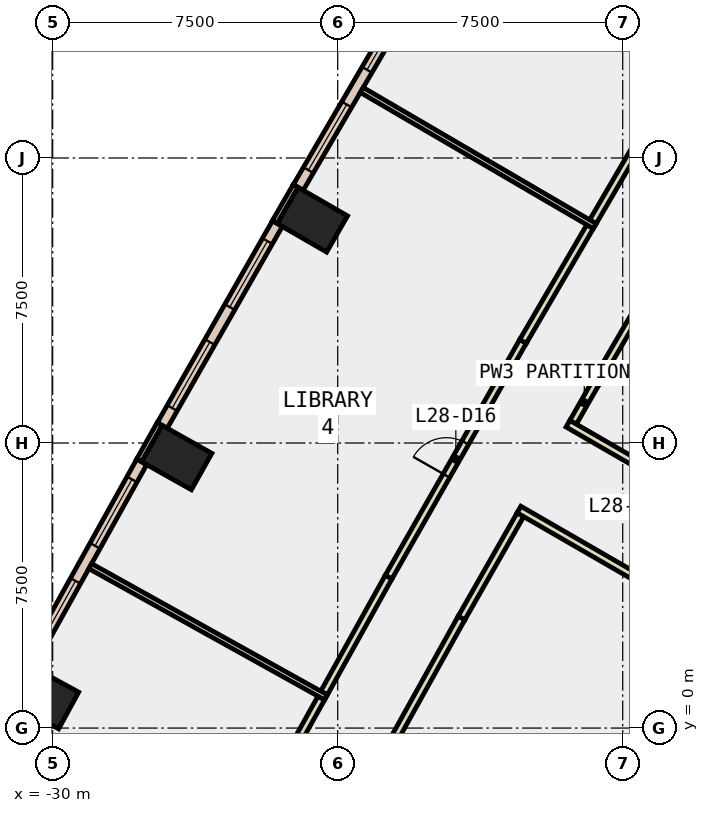
"""IFC4 building model, lengths in metres.
Left out: names, types, materials, properties, quantities, classifications, styles, units other than length and angle.
Written with IfcOpenShell. Run it as: python <this file> out.ifc"""

import sys

from ifc_helpers import new_model, si_unit, direction, frame, frame_2d, origin, origin_2d, place, context, subcontext, project, spatial, rectangle, extrude, element, fill, save


model = new_model("IFC4")
c1 = context("Model", 3, precision=1e-05, world=origin(), true_north=direction((0.0, 1.0)))
c2 = subcontext(c1, "Body", "Model", "MODEL_VIEW")
j1 = project(units=[si_unit("LENGTHUNIT", "METRE"), si_unit("PLANEANGLEUNIT", "RADIAN")], contexts=[c1])
p1 = place(None, origin())
s1 = spatial("IfcSite", under=j1, at=p1, CompositionType="ELEMENT")
p2 = place(p1, origin())
s2 = spatial("IfcBuilding", under=s1, at=p2, CompositionType="ELEMENT")
p3 = place(p2, frame((0.0, 0.0, 128.6)))
s3 = spatial("IfcBuildingStorey", under=s2, at=p3, CompositionType="ELEMENT", Elevation=128.6)
for number, where, z_axis, x_axis in (
    (1, (-23.166, 13.375, -0.4), (0.0, 0.0, 1.0), (0.5, 0.866, 0.0)),
    (2, (-26.735, 7.117, -0.4), (0.0, 0.0, 1.0), (0.49, 0.872, 0.0)),
    (3, (-30.238, 0.822, -0.4), (0.0, 0.0, 1.0), (0.48, 0.877, 0.0)),
):
    element("IfcColumn", number, at=place(p3, frame(where, z_axis=z_axis, x_axis=x_axis)), inside=s3, PredefinedType="COLUMN", context=c2, shape_type="SweptSolid", body=[
        extrude(rectangle(XDim=1.1, YDim=1.5, at=origin_2d()), origin(), (0.0, 0.0, 1.0), 4.0),
    ])
p4 = place(p3, frame((-23.605, 14.264, 0.0), z_axis=(0.0, 0.0, 1.0), x_axis=(-0.499933745558, -0.866063652425, 0.0)))
e4 = element("IfcWall", 4, at=p4, inside=s3, PredefinedType="STANDARD", context=c2, shape_type="SweptSolid", body=[
    extrude(rectangle(XDim=1.1, YDim=0.15, at=frame_2d((0.55, 0.0))), origin(), (0.0, 0.0, 1.0), 3.6),
])
p5 = place(p3, frame((-27.185, 8.001, 0.0), z_axis=(0.0, 0.0, 1.0), x_axis=(-0.490008344094, -0.871717742574, 0.0)))
e5 = element("IfcWall", 5, at=p5, inside=s3, PredefinedType="STANDARD", context=c2, shape_type="SweptSolid", body=[
    extrude(rectangle(XDim=1.1, YDim=0.15, at=frame_2d((0.55, 0.0))), origin(), (0.0, 0.0, 1.0), 3.6),
])
p6 = place(p3, frame((-20.454, 19.503, 0.0), z_axis=(0.0, 0.0, 1.0), x_axis=(-0.504441987427, -0.863445586775, 0.0)))
e6 = element("IfcWall", 6, at=p6, inside=s3, PredefinedType="STANDARD", context=c2, shape_type="SweptSolid", body=[
    extrude(rectangle(XDim=6.114, YDim=0.3, at=frame_2d((3.057, 0.0))), origin(), (0.0, 0.0, 1.0), 3.6),
])
p7 = place(p6, frame((0.528, 0.0, 0.9)))
e7 = element("IfcOpeningElement", 7, at=p7, cuts=e6, PredefinedType="OPENING", context=c2, shape_type="SweptSolid", body=[
    extrude(rectangle(XDim=2.0, YDim=2.6, at=frame_2d((1.0, 1.3))), frame((0.0, 0.16, 0.0), z_axis=(0.0, -1.0, 0.0), x_axis=(1.0, 0.0, 0.0)), (0.0, 0.0, 1.0), 0.32),
])
p8 = place(p6, frame((3.585, 0.0, 0.9)))
e8 = element("IfcOpeningElement", 8, at=p8, cuts=e6, PredefinedType="OPENING", context=c2, shape_type="SweptSolid", body=[
    extrude(rectangle(XDim=2.0, YDim=2.6, at=frame_2d((1.0, 1.3))), frame((0.0, 0.16, 0.0), z_axis=(0.0, -1.0, 0.0), x_axis=(1.0, 0.0, 0.0)), (0.0, 0.0, 1.0), 0.32),
])
p9 = place(p3, frame((-24.087, 13.273, 0.0), z_axis=(0.0, 0.0, 1.0), x_axis=(-0.495472401298, -0.868623681206, 0.0)))
e9 = element("IfcWall", 9, at=p9, inside=s3, PredefinedType="STANDARD", context=c2, shape_type="SweptSolid", body=[
    extrude(rectangle(XDim=6.115, YDim=0.3, at=frame_2d((3.058, 0.0))), origin(), (0.0, 0.0, 1.0), 3.6),
])
p10 = place(p9, frame((0.529, 0.0, 0.9)))
e10 = element("IfcOpeningElement", 10, at=p10, cuts=e9, PredefinedType="OPENING", context=c2, shape_type="SweptSolid", body=[
    extrude(rectangle(XDim=2.0, YDim=2.6, at=frame_2d((1.0, 1.3))), frame((0.0, 0.16, 0.0), z_axis=(0.0, -1.0, 0.0), x_axis=(1.0, 0.0, 0.0)), (0.0, 0.0, 1.0), 0.32),
])
p11 = place(p9, frame((3.587, 0.0, 0.9)))
e11 = element("IfcOpeningElement", 11, at=p11, cuts=e9, PredefinedType="OPENING", context=c2, shape_type="SweptSolid", body=[
    extrude(rectangle(XDim=2.0, YDim=2.6, at=frame_2d((1.0, 1.3))), frame((0.0, 0.16, 0.0), z_axis=(0.0, -1.0, 0.0), x_axis=(1.0, 0.0, 0.0)), (0.0, 0.0, 1.0), 0.32),
])
p12 = place(p3, frame((-27.656, 7.005, 0.0), z_axis=(0.0, 0.0, 1.0), x_axis=(-0.486229342917, -0.873831234327, 0.0)))
e12 = element("IfcWall", 12, at=p12, inside=s3, PredefinedType="STANDARD", context=c2, shape_type="SweptSolid", body=[
    extrude(rectangle(XDim=6.114, YDim=0.3, at=frame_2d((3.057, 0.0))), origin(), (0.0, 0.0, 1.0), 3.6),
])
p13 = place(p12, frame((0.529, 0.0, 0.9)))
e13 = element("IfcOpeningElement", 13, at=p13, cuts=e12, PredefinedType="OPENING", context=c2, shape_type="SweptSolid", body=[
    extrude(rectangle(XDim=2.0, YDim=2.6, at=frame_2d((1.0, 1.3))), frame((0.0, 0.16, 0.0), z_axis=(0.0, -1.0, 0.0), x_axis=(1.0, 0.0, 0.0)), (0.0, 0.0, 1.0), 0.32),
])
p14 = place(p12, frame((3.586, 0.0, 0.9)))
e14 = element("IfcOpeningElement", 14, at=p14, cuts=e12, PredefinedType="OPENING", context=c2, shape_type="SweptSolid", body=[
    extrude(rectangle(XDim=2.0, YDim=2.6, at=frame_2d((1.0, 1.3))), frame((0.0, 0.16, 0.0), z_axis=(0.0, -1.0, 0.0), x_axis=(1.0, 0.0, 0.0)), (0.0, 0.0, 1.0), 0.32),
])
p15 = place(p3, frame((-13.801, 12.356, 0.0), z_axis=(0.0, 0.0, 1.0), x_axis=(-0.504282474222, -0.863538757782, 0.0)))
e15 = element("IfcWall", 15, at=p15, inside=s3, PredefinedType="PARTITIONING", context=c2, shape_type="SweptSolid", body=[
    extrude(rectangle(XDim=3.8, YDim=0.2, at=frame_2d((1.9, 0.0))), origin(), (0.0, 0.0, 1.0), 3.6),
])
p16 = place(p3, frame((-15.717, 9.075, 0.0), z_axis=(0.0, 0.0, 1.0), x_axis=(-0.495695496657, -0.868496387208, 0.0)))
e16 = element("IfcWall", 16, at=p16, inside=s3, PredefinedType="PARTITIONING", context=c2, shape_type="SweptSolid", body=[
    extrude(rectangle(XDim=1.186, YDim=0.2, at=frame_2d((0.593, 0.0))), origin(), (0.0, 0.0, 1.0), 3.6),
])
p17 = place(p3, frame((-16.441, 8.008, 0.0), z_axis=(0.0, 0.0, 1.0), x_axis=(0.866020923391, -0.500007760188, 0.0)))
e17 = element("IfcWall", 17, at=p17, inside=s3, PredefinedType="PARTITIONING", context=c2, shape_type="SweptSolid", body=[
    extrude(rectangle(XDim=4.568, YDim=0.2, at=frame_2d((2.284, 0.0))), origin(), (0.0, 0.0, 1.0), 3.6),
])
p18 = place(p17, frame((1.997, 0.0, 0.0)))
e18 = element("IfcOpeningElement", 18, at=p18, cuts=e17, PredefinedType="OPENING", context=c2, shape_type="SweptSolid", body=[
    extrude(rectangle(XDim=1.0, YDim=2.1, at=frame_2d((0.5, 1.05))), frame((0.0, 0.11, 0.0), z_axis=(0.0, -1.0, 0.0), x_axis=(1.0, 0.0, 0.0)), (0.0, 0.0, 1.0), 0.22),
])
p19 = place(p3, frame((-17.692, 5.613, 0.0), z_axis=(0.0, 0.0, 1.0), x_axis=(-0.495492055461, -0.868612469963, 0.0)))
e19 = element("IfcWall", 19, at=p19, inside=s3, PredefinedType="PARTITIONING", context=c2, shape_type="SweptSolid", body=[
    extrude(rectangle(XDim=3.13, YDim=0.2, at=frame_2d((1.565, 0.0))), origin(), (0.0, 0.0, 1.0), 3.6),
])
p20 = place(p3, frame((-19.243, 2.894, 0.0), z_axis=(0.0, 0.0, 1.0), x_axis=(-0.486304341235, -0.873789498504, 0.0)))
e20 = element("IfcWall", 20, at=p20, inside=s3, PredefinedType="PARTITIONING", context=c2, shape_type="SweptSolid", body=[
    extrude(rectangle(XDim=7.113, YDim=0.2, at=frame_2d((3.556, 0.0))), origin(), (0.0, 0.0, 1.0), 3.6),
])
p21 = place(p3, frame((-15.784, 13.322, 0.0), z_axis=(0.0, 0.0, 1.0), x_axis=(0.50424043703, 0.863563304954, 0.0)))
e21 = element("IfcWall", 21, at=p21, inside=s3, PredefinedType="PARTITIONING", context=c2, shape_type="SweptSolid", body=[
    extrude(rectangle(XDim=3.492, YDim=0.2, at=frame_2d((1.746, 0.0))), origin(), (0.0, 0.0, 1.0), 3.6),
])
p22 = place(p3, frame((-22.859, 0.922, 0.0), z_axis=(0.0, 0.0, 1.0), x_axis=(0.486390484578, 0.873741550181, 0.0)))
e22 = element("IfcWall", 22, at=p22, inside=s3, PredefinedType="PARTITIONING", context=c2, shape_type="SweptSolid", body=[
    extrude(rectangle(XDim=3.493, YDim=0.2, at=frame_2d((1.747, 0.0))), origin(), (0.0, 0.0, 1.0), 3.6),
])
p23 = place(p3, frame((-21.16, 3.974, 0.0), z_axis=(0.0, 0.0, 1.0), x_axis=(0.495450054309, 0.868636427791, 0.0)))
e23 = element("IfcWall", 23, at=p23, inside=s3, PredefinedType="PARTITIONING", context=c2, shape_type="SweptSolid", body=[
    extrude(rectangle(XDim=7.139, YDim=0.2, at=frame_2d((3.569, 0.0))), origin(), (0.0, 0.0, 1.0), 3.6),
])
p24 = place(p23, frame((3.069, 0.0, 0.0)))
e24 = element("IfcOpeningElement", 24, at=p24, cuts=e23, PredefinedType="OPENING", context=c2, shape_type="SweptSolid", body=[
    extrude(rectangle(XDim=1.0, YDim=2.1, at=frame_2d((0.5, 1.05))), frame((0.0, 0.11, 0.0), z_axis=(0.0, -1.0, 0.0), x_axis=(1.0, 0.0, 0.0)), (0.0, 0.0, 1.0), 0.22),
])
p25 = place(p3, frame((-17.623, 10.175, 0.0), z_axis=(0.0, 0.0, 1.0), x_axis=(0.504383407959, 0.863479807393, 0.0)))
e25 = element("IfcWall", 25, at=p25, inside=s3, PredefinedType="PARTITIONING", context=c2, shape_type="SweptSolid", body=[
    extrude(rectangle(XDim=3.495, YDim=0.2, at=frame_2d((1.748, 0.0))), origin(), (0.0, 0.0, 1.0), 3.6),
])
p26 = place(p3, frame((-24.63, -2.262, 0.0), z_axis=(0.0, 0.0, 1.0), x_axis=(0.486058237491, 0.873926421255, 0.0)))
e26 = element("IfcWall", 26, at=p26, inside=s3, PredefinedType="PARTITIONING", context=c2, shape_type="SweptSolid", body=[
    extrude(rectangle(XDim=3.493, YDim=0.2, at=frame_2d((1.747, 0.0))), origin(), (0.0, 0.0, 1.0), 3.6),
])
p27 = place(p3, frame((-15.736, 13.207, 0.0), z_axis=(0.0, 0.0, 1.0), x_axis=(-0.863454426155, 0.504426856892, 0.0)))
e27 = element("IfcWall", 27, at=p27, inside=s3, PredefinedType="PARTITIONING", context=c2, shape_type="SweptSolid", body=[
    extrude(rectangle(XDim=7.099, YDim=0.15, at=frame_2d((3.55, 0.0))), origin(), (0.0, 0.0, 1.0), 3.6),
])
p28 = place(p3, frame((-22.808, 0.808, 0.0), z_axis=(0.0, 0.0, 1.0), x_axis=(-0.873839159938, 0.486215099066, 0.0)))
e28 = element("IfcWall", 28, at=p28, inside=s3, PredefinedType="PARTITIONING", context=c2, shape_type="SweptSolid", body=[
    extrude(rectangle(XDim=7.1, YDim=0.15, at=frame_2d((3.55, 0.0))), origin(), (0.0, 0.0, 1.0), 3.6),
])
p29 = place(p3, frame((-13.785, 3.473, 0.0), z_axis=(0.0, 0.0, 1.0), x_axis=(-0.866081168121, 0.499903400895, 0.0)))
e29 = element("IfcWall", 29, at=p29, inside=s3, PredefinedType="PARTITIONING", context=c2, shape_type="SweptSolid", body=[
    extrude(rectangle(XDim=4.555, YDim=0.2, at=frame_2d((2.278, 0.0))), origin(), (0.0, 0.0, 1.0), 3.6),
])
p30 = place(p7, origin())
e30 = element("IfcWindow", 30, at=p30, inside=s3, PartitioningType="SINGLE_PANEL", PredefinedType="WINDOW", context=c2, shape_type="SweptSolid", body=[
    extrude(rectangle(XDim=2.0, YDim=2.6, at=frame_2d((1.0, 1.3))), frame((0.0, 0.03, 0.0), z_axis=(0.0, -1.0, 0.0), x_axis=(1.0, 0.0, 0.0)), (0.0, 0.0, 1.0), 0.06),
])
fill(e7, e30)
p31 = place(p8, origin())
e31 = element("IfcWindow", 31, at=p31, inside=s3, PartitioningType="SINGLE_PANEL", PredefinedType="WINDOW", context=c2, shape_type="SweptSolid", body=[
    extrude(rectangle(XDim=2.0, YDim=2.6, at=frame_2d((1.0, 1.3))), frame((0.0, 0.03, 0.0), z_axis=(0.0, -1.0, 0.0), x_axis=(1.0, 0.0, 0.0)), (0.0, 0.0, 1.0), 0.06),
])
fill(e8, e31)
p32 = place(p10, origin())
e32 = element("IfcWindow", 32, at=p32, inside=s3, PartitioningType="SINGLE_PANEL", PredefinedType="WINDOW", context=c2, shape_type="SweptSolid", body=[
    extrude(rectangle(XDim=2.0, YDim=2.6, at=frame_2d((1.0, 1.3))), frame((0.0, 0.03, 0.0), z_axis=(0.0, -1.0, 0.0), x_axis=(1.0, 0.0, 0.0)), (0.0, 0.0, 1.0), 0.06),
])
fill(e10, e32)
p33 = place(p11, origin())
e33 = element("IfcWindow", 33, at=p33, inside=s3, PartitioningType="SINGLE_PANEL", PredefinedType="WINDOW", context=c2, shape_type="SweptSolid", body=[
    extrude(rectangle(XDim=2.0, YDim=2.6, at=frame_2d((1.0, 1.3))), frame((0.0, 0.03, 0.0), z_axis=(0.0, -1.0, 0.0), x_axis=(1.0, 0.0, 0.0)), (0.0, 0.0, 1.0), 0.06),
])
fill(e11, e33)
p34 = place(p13, origin())
e34 = element("IfcWindow", 34, at=p34, inside=s3, PartitioningType="SINGLE_PANEL", PredefinedType="WINDOW", context=c2, shape_type="SweptSolid", body=[
    extrude(rectangle(XDim=2.0, YDim=2.6, at=frame_2d((1.0, 1.3))), frame((0.0, 0.03, 0.0), z_axis=(0.0, -1.0, 0.0), x_axis=(1.0, 0.0, 0.0)), (0.0, 0.0, 1.0), 0.06),
])
fill(e13, e34)
p35 = place(p14, origin())
e35 = element("IfcWindow", 35, at=p35, inside=s3, PartitioningType="SINGLE_PANEL", PredefinedType="WINDOW", context=c2, shape_type="SweptSolid", body=[
    extrude(rectangle(XDim=2.0, YDim=2.6, at=frame_2d((1.0, 1.3))), frame((0.0, 0.03, 0.0), z_axis=(0.0, -1.0, 0.0), x_axis=(1.0, 0.0, 0.0)), (0.0, 0.0, 1.0), 0.06),
])
fill(e14, e35)
p36 = place(p24, origin())
e36 = element("IfcDoor", 36, at=p36, inside=s3, OperationType="SINGLE_SWING_LEFT", PredefinedType="DOOR", context=c2, shape_type="SweptSolid", body=[
    extrude(rectangle(XDim=1.0, YDim=2.1, at=frame_2d((0.5, 1.05))), frame((0.0, 0.025, 0.0), z_axis=(0.0, -1.0, 0.0), x_axis=(1.0, 0.0, 0.0)), (0.0, 0.0, 1.0), 0.05),
])
fill(e24, e36)
save(model, sys.argv[1])
